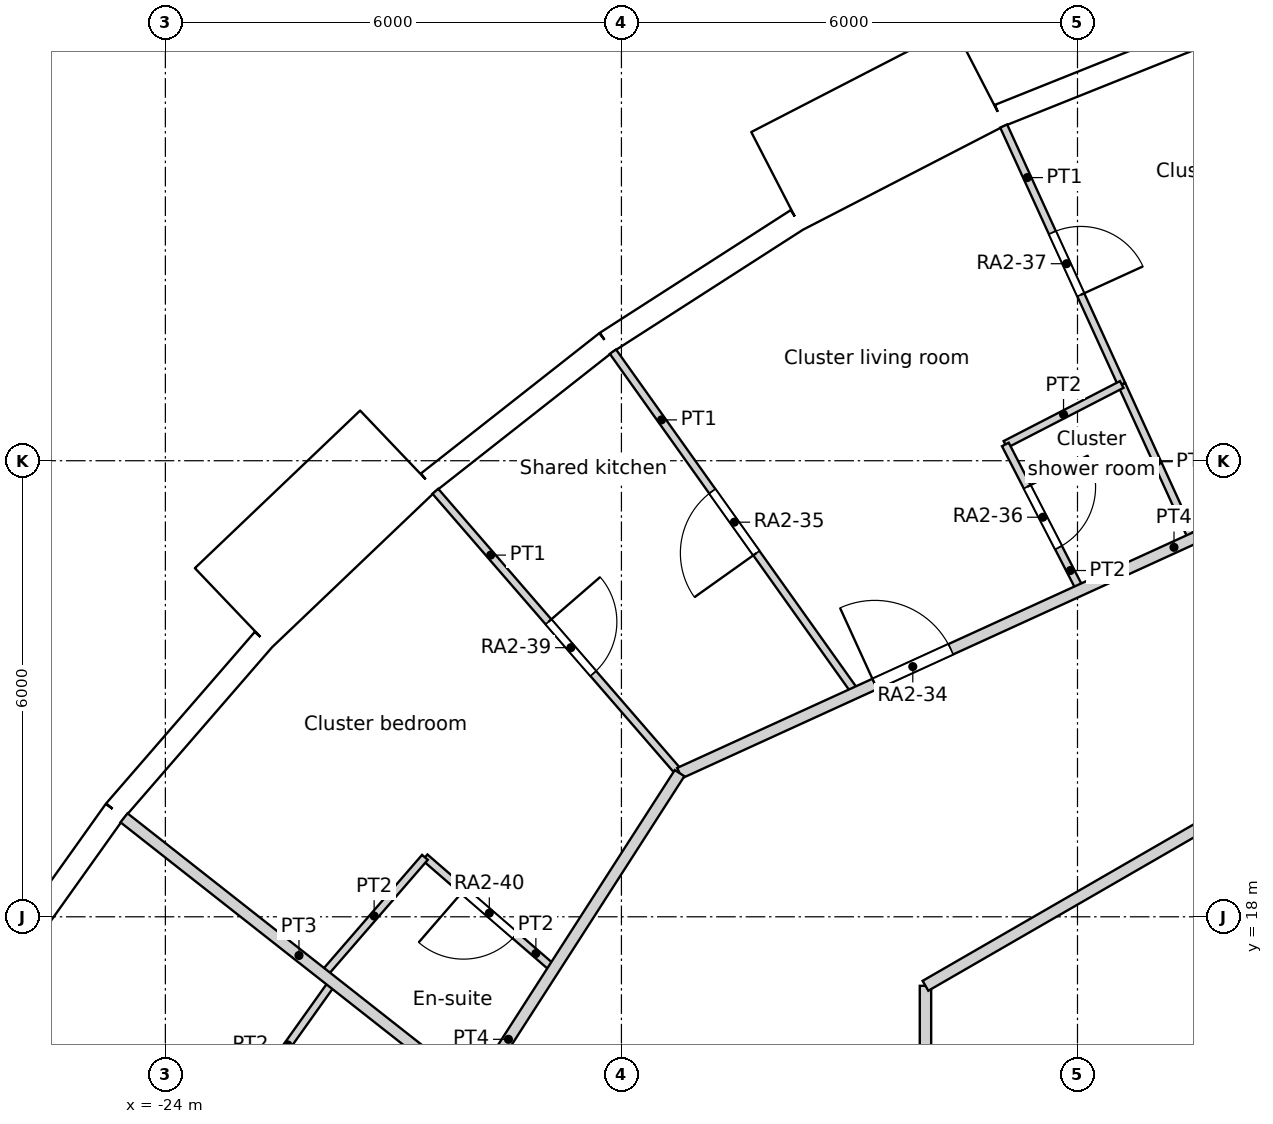
"""IFC4 building model, lengths in metres.
Left out: names, types, materials, properties, quantities, classifications, styles, units other than length and angle.
Written with IfcOpenShell. Run it as: python <this file> out.ifc"""

import sys

from ifc_helpers import new_model, si_unit, direction, frame, frame_2d, origin, origin_2d, place, context, subcontext, project, spatial, rectangle, circle, extrude, element, fill, save


model = new_model("IFC4")
c1 = context("Model", 3, precision=1e-05, world=origin(), true_north=direction((0.0, 1.0)))
c2 = subcontext(c1, "Body", "Model", "MODEL_VIEW")
j1 = project(units=[si_unit("LENGTHUNIT", "METRE"), si_unit("PLANEANGLEUNIT", "RADIAN")], contexts=[c1])
p1 = place(None, origin())
s1 = spatial("IfcSite", under=j1, at=p1, CompositionType="ELEMENT")
p2 = place(p1, origin())
s2 = spatial("IfcBuilding", under=s1, at=p2, CompositionType="ELEMENT")
p3 = place(p2, frame((0.0, 0.0, 39.0)))
s3 = spatial("IfcBuildingStorey", under=s2, at=p3, CompositionType="ELEMENT", Elevation=39.0)
for number, where, z_axis, x_axis in (
    (1, (-9.902, 28.61, 0.0), (0.0, 0.0, 1.0), (1.0, 0.0, 0.0)),
    (2, (-15.137, 26.219, 0.0), (0.0, 0.0, 1.0), (1.0, 0.0, 0.0)),
    (3, (-19.826, 22.88, 0.0), (0.0, 0.0, 1.0), (1.0, 0.0, 0.0)),
    (4, (-23.797, 18.715, 0.0), (0.0, 0.0, 1.0), (1.0, 0.0, 0.0)),
):
    element("IfcColumn", number, at=place(p3, frame(where, z_axis=z_axis, x_axis=x_axis)), inside=s3, PredefinedType="COLUMN", context=c2, shape_type="SweptSolid", body=[
        extrude(circle(Radius=0.7, at=origin_2d()), origin(), (0.0, 0.0, 1.0), 3.6),
    ])
for number, where, z_axis, x_axis in (
    (5, (-12.274, 21.259, 0.0), (0.0, 0.0, 1.0), (1.0, 0.0, 0.0)),
    (6, (-16.846, 17.855, 0.0), (0.0, 0.0, 1.0), (1.0, 0.0, 0.0)),
):
    element("IfcColumn", number, at=place(p3, frame(where, z_axis=z_axis, x_axis=x_axis)), inside=s3, PredefinedType="COLUMN", context=c2, shape_type="SweptSolid", body=[
        extrude(circle(Radius=0.75, at=origin_2d()), origin(), (0.0, 0.0, 1.0), 3.6),
    ])
p4 = place(p3, frame((-10.261, 29.649, 0.0), z_axis=(0.0, 0.0, 1.0), x_axis=(-0.928374947, -0.371644935098, 0.0)))
e7 = element("IfcWall", 7, at=p4, inside=s3, PredefinedType="SOLIDWALL", context=c2, shape_type="SweptSolid", body=[
    extrude(rectangle(XDim=2.98, YDim=0.3, at=frame_2d((1.49, 0.0))), origin(), (0.0, 0.0, 1.0), 3.15),
])
p5 = place(p4, frame((1.49, 0.0, 1.55)))
e8 = element("IfcOpeningElement", 8, at=p5, cuts=e7, PredefinedType="OPENING", context=c2, shape_type="SweptSolid", body=[
    extrude(circle(Radius=0.9, at=origin_2d()), frame((0.0, 0.16, 0.0), z_axis=(0.0, -1.0, 0.0), x_axis=(1.0, 0.0, 0.0)), (0.0, 0.0, 1.0), 0.32),
])
p6 = place(p3, frame((-13.291, 29.053, -0.45), z_axis=(0.0, 0.0, 1.0), x_axis=(-0.888858064689, -0.458182650083, 0.0)))
e9 = element("IfcWall", 9, at=p6, inside=s3, PredefinedType="ELEMENTEDWALL", context=c2, shape_type="SweptSolid", body=[
    extrude(rectangle(XDim=3.0, YDim=1.45, at=frame_2d((1.5, 0.0))), origin(), (0.0, 0.0, 1.0), 3.6),
])
p7 = place(p6, frame((1.5, 0.0, 2.0)))
e10 = element("IfcOpeningElement", 10, at=p7, cuts=e9, PredefinedType="OPENING", context=c2, shape_type="SweptSolid", body=[
    extrude(circle(Radius=0.9, at=origin_2d()), frame((0.0, 0.735, 0.0), z_axis=(0.0, -1.0, 0.0), x_axis=(1.0, 0.0, 0.0)), (0.0, 0.0, 1.0), 1.47),
])
p8 = place(p3, frame((-15.692, 27.168, 0.0), z_axis=(0.0, 0.0, 1.0), x_axis=(-0.841260995538, -0.54062920508, 0.0)))
e11 = element("IfcWall", 11, at=p8, inside=s3, PredefinedType="SOLIDWALL", context=c2, shape_type="SweptSolid", body=[
    extrude(rectangle(XDim=2.979, YDim=0.3, at=frame_2d((1.49, 0.0))), origin(), (0.0, 0.0, 1.0), 3.15),
])
p9 = place(p8, frame((1.49, 0.0, 1.55)))
e12 = element("IfcOpeningElement", 12, at=p9, cuts=e11, PredefinedType="OPENING", context=c2, shape_type="SweptSolid", body=[
    extrude(circle(Radius=0.9, at=origin_2d()), frame((0.0, 0.16, 0.0), z_axis=(0.0, -1.0, 0.0), x_axis=(1.0, 0.0, 0.0)), (0.0, 0.0, 1.0), 0.32),
])
p10 = place(p3, frame((-18.199, 25.557, 0.0), z_axis=(0.0, 0.0, 1.0), x_axis=(-0.786053834673, -0.618158045322, 0.0)))
e13 = element("IfcWall", 13, at=p10, inside=s3, PredefinedType="SOLIDWALL", context=c2, shape_type="SweptSolid", body=[
    extrude(rectangle(XDim=2.979, YDim=0.3, at=frame_2d((1.49, 0.0))), origin(), (0.0, 0.0, 1.0), 3.15),
])
p11 = place(p10, frame((1.49, 0.0, 1.55)))
e14 = element("IfcOpeningElement", 14, at=p11, cuts=e13, PredefinedType="OPENING", context=c2, shape_type="SweptSolid", body=[
    extrude(circle(Radius=0.9, at=origin_2d()), frame((0.0, 0.16, 0.0), z_axis=(0.0, -1.0, 0.0), x_axis=(1.0, 0.0, 0.0)), (0.0, 0.0, 1.0), 0.32),
])
p12 = place(p3, frame((-20.938, 24.132, -0.45), z_axis=(0.0, 0.0, 1.0), x_axis=(-0.723712023899, -0.690102098579, 0.0)))
e15 = element("IfcWall", 15, at=p12, inside=s3, PredefinedType="ELEMENTEDWALL", context=c2, shape_type="SweptSolid", body=[
    extrude(rectangle(XDim=3.0, YDim=1.45, at=frame_2d((1.5, 0.0))), origin(), (0.0, 0.0, 1.0), 3.6),
])
p13 = place(p12, frame((1.5, 0.0, 2.0)))
e16 = element("IfcOpeningElement", 16, at=p13, cuts=e15, PredefinedType="OPENING", context=c2, shape_type="SweptSolid", body=[
    extrude(circle(Radius=0.9, at=origin_2d()), frame((0.0, 0.735, 0.0), z_axis=(0.0, -1.0, 0.0), x_axis=(1.0, 0.0, 0.0)), (0.0, 0.0, 1.0), 1.47),
])
p14 = place(p3, frame((-22.711, 21.646, 0.0), z_axis=(0.0, 0.0, 1.0), x_axis=(-0.654830712471, -0.755775587066, 0.0)))
e17 = element("IfcWall", 17, at=p14, inside=s3, PredefinedType="SOLIDWALL", context=c2, shape_type="SweptSolid", body=[
    extrude(rectangle(XDim=2.98, YDim=0.3, at=frame_2d((1.49, 0.0))), origin(), (0.0, 0.0, 1.0), 3.15),
])
p15 = place(p14, frame((1.49, 0.0, 1.55)))
e18 = element("IfcOpeningElement", 18, at=p15, cuts=e17, PredefinedType="OPENING", context=c2, shape_type="SweptSolid", body=[
    extrude(circle(Radius=0.9, at=origin_2d()), frame((0.0, 0.16, 0.0), z_axis=(0.0, -1.0, 0.0), x_axis=(1.0, 0.0, 0.0)), (0.0, 0.0, 1.0), 0.32),
])
p16 = place(p3, frame((-24.662, 19.394, 0.0), z_axis=(0.0, 0.0, 1.0), x_axis=(-0.580113774115, -0.814535456, 0.0)))
e19 = element("IfcWall", 19, at=p16, inside=s3, PredefinedType="SOLIDWALL", context=c2, shape_type="SweptSolid", body=[
    extrude(rectangle(XDim=2.98, YDim=0.3, at=frame_2d((1.49, 0.0))), origin(), (0.0, 0.0, 1.0), 3.15),
])
p17 = place(p16, frame((1.49, 0.0, 1.55)))
e20 = element("IfcOpeningElement", 20, at=p17, cuts=e19, PredefinedType="OPENING", context=c2, shape_type="SweptSolid", body=[
    extrude(circle(Radius=0.9, at=origin_2d()), frame((0.0, 0.16, 0.0), z_axis=(0.0, -1.0, 0.0), x_axis=(1.0, 0.0, 0.0)), (0.0, 0.0, 1.0), 0.32),
])
p18 = place(p3, frame((-14.0, 17.092, 0.0), z_axis=(0.0, 0.0, 1.0), x_axis=(0.86602719091, 0.499996904595, 0.0)))
e21 = element("IfcWall", 21, at=p18, inside=s3, PredefinedType="PARTITIONING", context=c2, shape_type="SweptSolid", body=[
    extrude(rectangle(XDim=9.42, YDim=0.15, at=frame_2d((4.71, 0.0))), origin(), (0.0, 0.0, 1.0), 3.15),
])
p19 = place(p3, frame((-14.0, 11.8, 0.0), z_axis=(0.0, 0.0, 1.0), x_axis=(0.0, 1.0, 0.0)))
e22 = element("IfcWall", 22, at=p19, inside=s3, PredefinedType="PARTITIONING", context=c2, shape_type="SweptSolid", body=[
    extrude(rectangle(XDim=5.292, YDim=0.15, at=frame_2d((2.646, 0.0))), origin(), (0.0, 0.0, 1.0), 3.15),
])
p20 = place(p3, frame((-17.235, 19.89, 0.0), z_axis=(0.0, 0.0, 1.0), x_axis=(0.909655192768, 0.415364213999, 0.0)))
e23 = element("IfcWall", 23, at=p20, inside=s3, PredefinedType="PARTITIONING", context=c2, shape_type="SweptSolid", body=[
    extrude(rectangle(XDim=10.328, YDim=0.15, at=frame_2d((5.164, 0.0))), origin(), (0.0, 0.0, 1.0), 3.15),
])
p21 = place(p20, frame((2.823, 0.0, 0.0)))
e24 = element("IfcOpeningElement", 24, at=p21, cuts=e23, PredefinedType="OPENING", context=c2, shape_type="SweptSolid", body=[
    extrude(rectangle(XDim=1.1, YDim=2.1, at=frame_2d((0.55, 1.05))), frame((0.0, 0.075, 0.0), z_axis=(0.0, -1.0, 0.0), x_axis=(1.0, 0.0, 0.0)), (0.0, 0.0, 1.0), 0.15),
])
p22 = place(p3, frame((-25.255, 7.416, 0.0), z_axis=(0.0, 0.0, 1.0), x_axis=(0.540805851332, 0.841147449123, 0.0)))
e25 = element("IfcWall", 25, at=p22, inside=s3, PredefinedType="PARTITIONING", context=c2, shape_type="SweptSolid", body=[
    extrude(rectangle(XDim=14.829, YDim=0.15, at=frame_2d((7.415, 0.0))), origin(), (0.0, 0.0, 1.0), 3.15),
])
p23 = place(p22, frame((5.453, 0.0, 0.0)))
e26 = element("IfcOpeningElement", 26, at=p23, cuts=e25, PredefinedType="OPENING", context=c2, shape_type="SweptSolid", body=[
    extrude(rectangle(XDim=1.0, YDim=2.1, at=frame_2d((0.5, 1.05))), frame((0.0, 0.075, 0.0), z_axis=(0.0, -1.0, 0.0), x_axis=(1.0, 0.0, 0.0)), (0.0, 0.0, 1.0), 0.15),
])
p24 = place(p22, frame((3.013, 0.0, 0.0)))
e27 = element("IfcOpeningElement", 27, at=p24, cuts=e25, PredefinedType="OPENING", context=c2, shape_type="SweptSolid", body=[
    extrude(rectangle(XDim=1.0, YDim=2.1, at=frame_2d((0.5, 1.05))), frame((0.0, 0.075, 0.0), z_axis=(0.0, -1.0, 0.0), x_axis=(1.0, 0.0, 0.0)), (0.0, 0.0, 1.0), 0.15),
])
p25 = place(p3, frame((-18.112, 25.435, 0.0), z_axis=(0.0, 0.0, 1.0), x_axis=(0.580004598464, -0.81461320009, 0.0)))
e28 = element("IfcWall", 28, at=p25, inside=s3, PredefinedType="PARTITIONING", context=c2, shape_type="SweptSolid", body=[
    extrude(rectangle(XDim=5.507, YDim=0.1, at=frame_2d((2.753, 0.0))), origin(), (0.0, 0.0, 1.0), 3.15),
])
p26 = place(p25, frame((2.254, 0.0, 0.0)))
e29 = element("IfcOpeningElement", 29, at=p26, cuts=e28, PredefinedType="OPENING", context=c2, shape_type="SweptSolid", body=[
    extrude(rectangle(XDim=1.0, YDim=2.04, at=frame_2d((0.5, 1.02))), frame((0.0, 0.05, 0.0), z_axis=(0.0, -1.0, 0.0), x_axis=(1.0, 0.0, 0.0)), (0.0, 0.0, 1.0), 0.1),
])
p27 = place(p3, frame((-12.949, 24.214, 0.0), z_axis=(0.0, 0.0, 1.0), x_axis=(0.888946574069, 0.458010904292, 0.0)))
e30 = element("IfcWall", 30, at=p27, inside=s3, PredefinedType="PARTITIONING", context=c2, shape_type="SweptSolid", body=[
    extrude(rectangle(XDim=1.722, YDim=0.1, at=frame_2d((0.861, 0.0))), origin(), (0.0, 0.0, 1.0), 3.15),
])
p28 = place(p3, frame((-12.949, 24.214, 0.0), z_axis=(0.0, 0.0, 1.0), x_axis=(0.458149254338, -0.888875278512, 0.0)))
e31 = element("IfcWall", 31, at=p28, inside=s3, PredefinedType="PARTITIONING", context=c2, shape_type="SweptSolid", body=[
    extrude(rectangle(XDim=2.155, YDim=0.1, at=frame_2d((1.077, 0.0))), origin(), (0.0, 0.0, 1.0), 3.15),
])
p29 = place(p28, frame((0.627, 0.0, 0.0)))
e32 = element("IfcOpeningElement", 32, at=p29, cuts=e31, PredefinedType="OPENING", context=c2, shape_type="SweptSolid", body=[
    extrude(rectangle(XDim=0.9, YDim=2.0, at=frame_2d((0.45, 1.0))), frame((0.0, 0.05, 0.0), z_axis=(0.0, -1.0, 0.0), x_axis=(1.0, 0.0, 0.0)), (0.0, 0.0, 1.0), 0.1),
])
p30 = place(p3, frame((-12.971, 28.403, 0.0), z_axis=(0.0, 0.0, 1.0), x_axis=(0.415455663581, -0.909613429759, 0.0)))
e33 = element("IfcWall", 33, at=p30, inside=s3, PredefinedType="PARTITIONING", context=c2, shape_type="SweptSolid", body=[
    extrude(rectangle(XDim=3.738, YDim=0.1, at=frame_2d((1.869, 0.0))), origin(), (0.0, 0.0, 1.0), 3.15),
])
p31 = place(p30, frame((1.541, 0.0, 0.0)))
e34 = element("IfcOpeningElement", 34, at=p31, cuts=e33, PredefinedType="OPENING", context=c2, shape_type="SweptSolid", body=[
    extrude(rectangle(XDim=0.9, YDim=2.1, at=frame_2d((0.45, 1.05))), frame((0.0, 0.05, 0.0), z_axis=(0.0, -1.0, 0.0), x_axis=(1.0, 0.0, 0.0)), (0.0, 0.0, 1.0), 0.1),
])
p32 = place(p3, frame((-20.448, 23.598, 0.0), z_axis=(0.0, 0.0, 1.0), x_axis=(0.654847179409, -0.755761319214, 0.0)))
e35 = element("IfcWall", 35, at=p32, inside=s3, PredefinedType="PARTITIONING", context=c2, shape_type="SweptSolid", body=[
    extrude(rectangle(XDim=4.906, YDim=0.1, at=frame_2d((2.453, 0.0))), origin(), (0.0, 0.0, 1.0), 3.15),
])
p33 = place(p32, frame((2.272, 0.0, 0.0)))
e36 = element("IfcOpeningElement", 36, at=p33, cuts=e35, PredefinedType="OPENING", context=c2, shape_type="SweptSolid", body=[
    extrude(rectangle(XDim=0.9, YDim=2.1, at=frame_2d((0.45, 1.05))), frame((0.0, 0.05, 0.0), z_axis=(0.0, -1.0, 0.0), x_axis=(1.0, 0.0, 0.0)), (0.0, 0.0, 1.0), 0.1),
])
p34 = place(p3, frame((-11.418, 25.003, 0.0), z_axis=(0.0, 0.0, 1.0), x_axis=(0.415416212057, -0.909631447764, 0.0)))
e37 = element("IfcWall", 37, at=p34, inside=s3, PredefinedType="PARTITIONING", context=c2, shape_type="SweptSolid", body=[
    extrude(rectangle(XDim=2.234, YDim=0.1, at=frame_2d((1.117, 0.0))), origin(), (0.0, 0.0, 1.0), 3.15),
])
p35 = place(p3, frame((-20.585, 18.782, 0.0), z_axis=(0.0, 0.0, 1.0), x_axis=(0.755685488978, -0.6549346851, 0.0)))
e38 = element("IfcWall", 38, at=p35, inside=s3, PredefinedType="PARTITIONING", context=c2, shape_type="SweptSolid", body=[
    extrude(rectangle(XDim=2.241, YDim=0.1, at=frame_2d((1.121, 0.0))), origin(), (0.0, 0.0, 1.0), 3.15),
])
p36 = place(p35, frame((0.671, 0.0, 0.0)))
e39 = element("IfcOpeningElement", 39, at=p36, cuts=e38, PredefinedType="OPENING", context=c2, shape_type="SweptSolid", body=[
    extrude(rectangle(XDim=0.9, YDim=2.04, at=frame_2d((0.45, 1.02))), frame((0.0, 0.05, 0.0), z_axis=(0.0, -1.0, 0.0), x_axis=(1.0, 0.0, 0.0)), (0.0, 0.0, 1.0), 0.1),
])
p37 = place(p3, frame((-21.922, 17.239, 0.0), z_axis=(0.0, 0.0, 1.0), x_axis=(0.654907776539, 0.755708809152, 0.0)))
e40 = element("IfcWall", 40, at=p37, inside=s3, PredefinedType="PARTITIONING", context=c2, shape_type="SweptSolid", body=[
    extrude(rectangle(XDim=2.042, YDim=0.1, at=frame_2d((1.021, 0.0))), origin(), (0.0, 0.0, 1.0), 3.15),
])
p38 = place(p3, frame((-24.544, 19.302, 0.0), z_axis=(0.0, 0.0, 1.0), x_axis=(0.785905950196, -0.618346049916, 0.0)))
e41 = element("IfcWall", 41, at=p38, inside=s3, PredefinedType="PARTITIONING", context=c2, shape_type="SweptSolid", body=[
    extrude(rectangle(XDim=5.857, YDim=0.15, at=frame_2d((2.929, 0.0))), origin(), (0.0, 0.0, 1.0), 3.15),
])
p39 = place(p3, frame((-22.978, 15.486, 0.0), z_axis=(0.0, 0.0, 1.0), x_axis=(0.580283748447, 0.814414373208, 0.0)))
e42 = element("IfcWall", 42, at=p39, inside=s3, PredefinedType="PARTITIONING", context=c2, shape_type="SweptSolid", body=[
    extrude(rectangle(XDim=2.033, YDim=0.1, at=frame_2d((1.017, 0.0))), origin(), (0.0, 0.0, 1.0), 3.15),
])
p40 = place(p5, origin())
e43 = element("IfcWindow", 43, at=p40, inside=s3, PartitioningType="SINGLE_PANEL", PredefinedType="WINDOW", context=c2, shape_type="SweptSolid", body=[
    extrude(circle(Radius=0.9, at=origin_2d()), frame((0.0, 0.12, 0.0), z_axis=(0.0, -1.0, 0.0), x_axis=(1.0, 0.0, 0.0)), (0.0, 0.0, 1.0), 0.1),
])
fill(e8, e43)
p41 = place(p7, origin())
e44 = element("IfcWindow", 44, at=p41, inside=s3, PartitioningType="SINGLE_PANEL", PredefinedType="WINDOW", context=c2, shape_type="SweptSolid", body=[
    extrude(circle(Radius=0.9, at=origin_2d()), frame((0.0, 0.695, 0.0), z_axis=(0.0, -1.0, 0.0), x_axis=(1.0, 0.0, 0.0)), (0.0, 0.0, 1.0), 0.1),
])
fill(e10, e44)
p42 = place(p9, origin())
e45 = element("IfcWindow", 45, at=p42, inside=s3, PartitioningType="SINGLE_PANEL", PredefinedType="WINDOW", context=c2, shape_type="SweptSolid", body=[
    extrude(circle(Radius=0.9, at=origin_2d()), frame((0.0, 0.12, 0.0), z_axis=(0.0, -1.0, 0.0), x_axis=(1.0, 0.0, 0.0)), (0.0, 0.0, 1.0), 0.1),
])
fill(e12, e45)
p43 = place(p11, origin())
e46 = element("IfcWindow", 46, at=p43, inside=s3, PartitioningType="SINGLE_PANEL", PredefinedType="WINDOW", context=c2, shape_type="SweptSolid", body=[
    extrude(circle(Radius=0.9, at=origin_2d()), frame((0.0, 0.12, 0.0), z_axis=(0.0, -1.0, 0.0), x_axis=(1.0, 0.0, 0.0)), (0.0, 0.0, 1.0), 0.1),
])
fill(e14, e46)
p44 = place(p13, origin())
e47 = element("IfcWindow", 47, at=p44, inside=s3, PartitioningType="SINGLE_PANEL", PredefinedType="WINDOW", context=c2, shape_type="SweptSolid", body=[
    extrude(circle(Radius=0.9, at=origin_2d()), frame((0.0, 0.695, 0.0), z_axis=(0.0, -1.0, 0.0), x_axis=(1.0, 0.0, 0.0)), (0.0, 0.0, 1.0), 0.1),
])
fill(e16, e47)
p45 = place(p15, origin())
e48 = element("IfcWindow", 48, at=p45, inside=s3, PartitioningType="SINGLE_PANEL", PredefinedType="WINDOW", context=c2, shape_type="SweptSolid", body=[
    extrude(circle(Radius=0.9, at=origin_2d()), frame((0.0, 0.12, 0.0), z_axis=(0.0, -1.0, 0.0), x_axis=(1.0, 0.0, 0.0)), (0.0, 0.0, 1.0), 0.1),
])
fill(e18, e48)
p46 = place(p17, origin())
e49 = element("IfcWindow", 49, at=p46, inside=s3, PartitioningType="SINGLE_PANEL", PredefinedType="WINDOW", context=c2, shape_type="SweptSolid", body=[
    extrude(circle(Radius=0.9, at=origin_2d()), frame((0.0, 0.12, 0.0), z_axis=(0.0, -1.0, 0.0), x_axis=(1.0, 0.0, 0.0)), (0.0, 0.0, 1.0), 0.1),
])
fill(e20, e49)
p47 = place(p21, origin())
e50 = element("IfcDoor", 50, at=p47, inside=s3, OperationType="SINGLE_SWING_LEFT", PredefinedType="DOOR", context=c2, shape_type="SweptSolid", body=[
    extrude(rectangle(XDim=1.1, YDim=2.1, at=frame_2d((0.55, 1.05))), frame((0.0, 0.025, 0.0), z_axis=(0.0, -1.0, 0.0), x_axis=(1.0, 0.0, 0.0)), (0.0, 0.0, 1.0), 0.05),
])
fill(e24, e50)
p48 = place(p26, origin())
e51 = element("IfcDoor", 51, at=p48, inside=s3, OperationType="SINGLE_SWING_LEFT", PredefinedType="DOOR", context=c2, shape_type="SweptSolid", body=[
    extrude(rectangle(XDim=1.0, YDim=2.04, at=frame_2d((0.5, 1.02))), frame((0.0, 0.025, 0.0), z_axis=(0.0, -1.0, 0.0), x_axis=(1.0, 0.0, 0.0)), (0.0, 0.0, 1.0), 0.05),
])
fill(e29, e51)
p49 = place(p29, origin())
e52 = element("IfcDoor", 52, at=p49, inside=s3, OperationType="SINGLE_SWING_LEFT", PredefinedType="DOOR", context=c2, shape_type="SweptSolid", body=[
    extrude(rectangle(XDim=0.9, YDim=2.0, at=frame_2d((0.45, 1.0))), frame((0.0, 0.025, 0.0), z_axis=(0.0, -1.0, 0.0), x_axis=(1.0, 0.0, 0.0)), (0.0, 0.0, 1.0), 0.05),
])
fill(e32, e52)
p50 = place(p31, origin())
e53 = element("IfcDoor", 53, at=p50, inside=s3, OperationType="SINGLE_SWING_RIGHT", PredefinedType="DOOR", context=c2, shape_type="SweptSolid", body=[
    extrude(rectangle(XDim=0.9, YDim=2.1, at=frame_2d((0.45, 1.05))), frame((0.0, 0.025, 0.0), z_axis=(0.0, -1.0, 0.0), x_axis=(1.0, 0.0, 0.0)), (0.0, 0.0, 1.0), 0.05),
])
fill(e34, e53)
p51 = place(p33, origin())
e54 = element("IfcDoor", 54, at=p51, inside=s3, OperationType="SINGLE_SWING_LEFT", PredefinedType="DOOR", context=c2, shape_type="SweptSolid", body=[
    extrude(rectangle(XDim=0.9, YDim=2.1, at=frame_2d((0.45, 1.05))), frame((0.0, 0.025, 0.0), z_axis=(0.0, -1.0, 0.0), x_axis=(1.0, 0.0, 0.0)), (0.0, 0.0, 1.0), 0.05),
])
fill(e36, e54)
p52 = place(p36, origin())
e55 = element("IfcDoor", 55, at=p52, inside=s3, OperationType="SINGLE_SWING_RIGHT", PredefinedType="DOOR", context=c2, shape_type="SweptSolid", body=[
    extrude(rectangle(XDim=0.9, YDim=2.04, at=frame_2d((0.45, 1.02))), frame((0.0, 0.025, 0.0), z_axis=(0.0, -1.0, 0.0), x_axis=(1.0, 0.0, 0.0)), (0.0, 0.0, 1.0), 0.05),
])
fill(e39, e55)
save(model, sys.argv[1])
